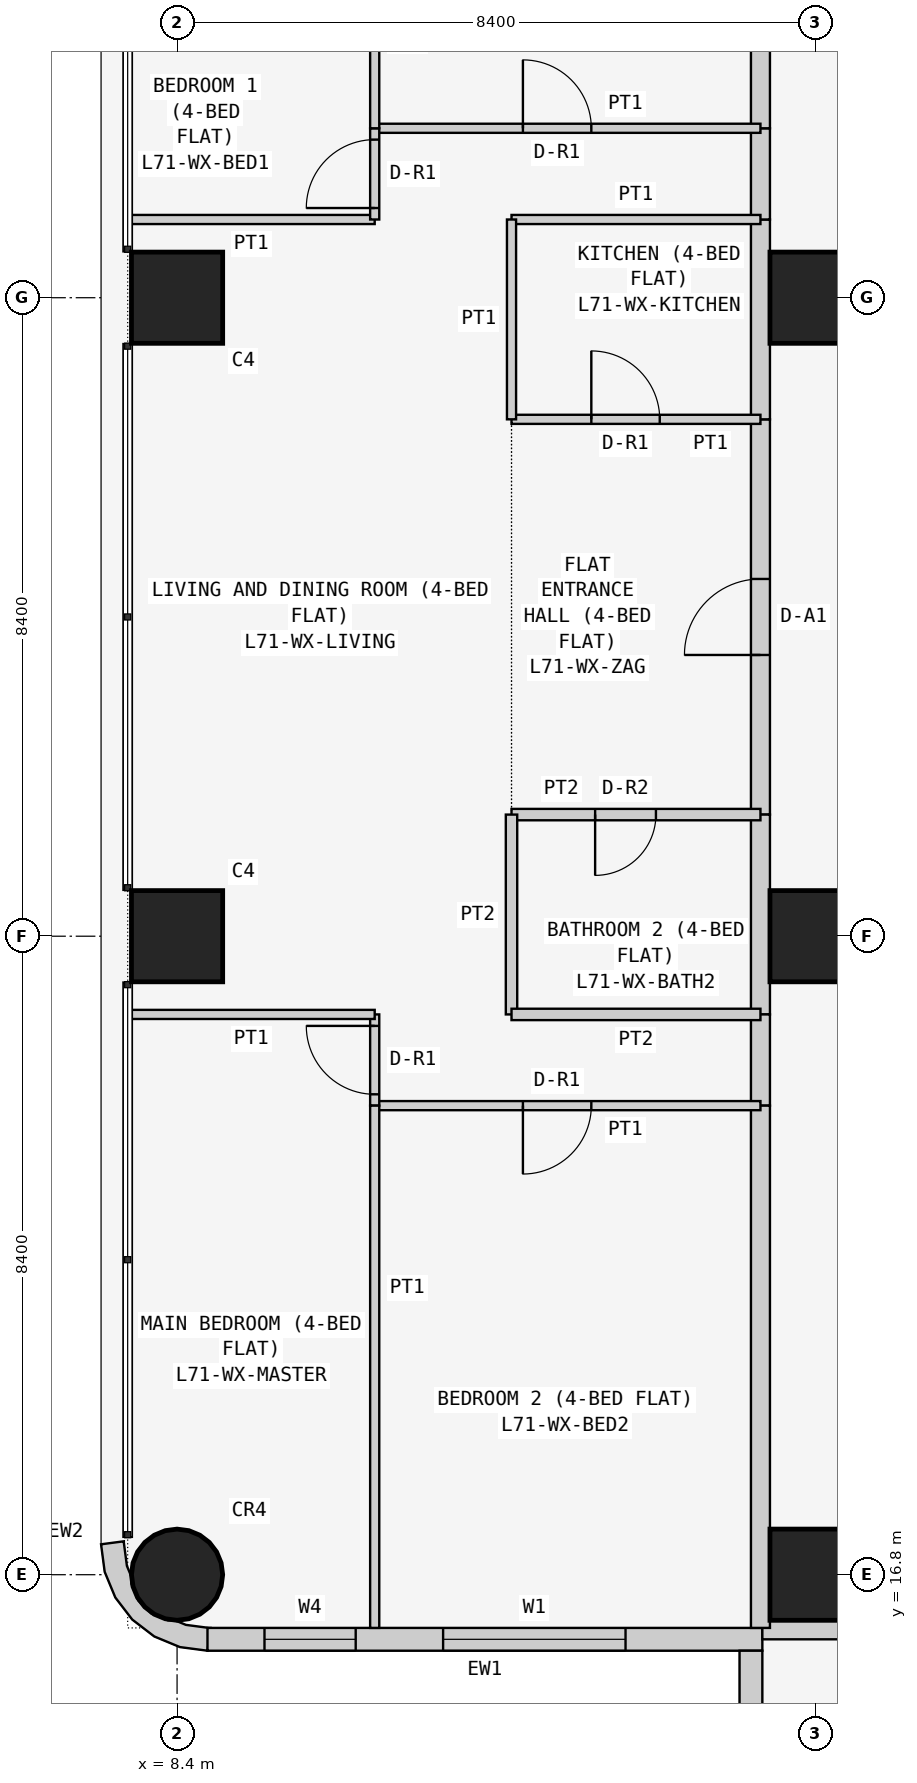
"""IFC4 building model, lengths in metres.
Left out: names, types, materials, properties, quantities, classifications, styles, units other than length and angle.
Written with IfcOpenShell. Run it as: python <this file> out.ifc"""

import sys

from ifc_helpers import new_model, si_unit, direction, frame, frame_2d, origin, origin_2d, place, context, subcontext, project, spatial, polyline, rectangle, circle, outline, extrude, element, fill, save


model = new_model("IFC4")
c1 = context("Model", 3, precision=1e-05, world=origin(), true_north=direction((0.0, 1.0)))
c2 = subcontext(c1, "Body", "Model", "MODEL_VIEW")
j1 = project(units=[si_unit("LENGTHUNIT", "METRE"), si_unit("PLANEANGLEUNIT", "RADIAN")], contexts=[c1])
p1 = place(None, origin())
s1 = spatial("IfcSite", under=j1, at=p1, CompositionType="ELEMENT")
p2 = place(p1, origin())
s2 = spatial("IfcBuilding", under=s1, at=p2, CompositionType="ELEMENT")
p3 = place(p2, frame((0.0, 0.0, 272.1)))
s3 = spatial("IfcBuildingStorey", under=s2, at=p3, CompositionType="ELEMENT", Elevation=272.1)
p4 = place(p3, frame((8.4, 16.8, 0.0), z_axis=(0.0, 0.0, 1.0), x_axis=(1.0, 0.0, 0.0)))
e1 = element("IfcColumn", 1, at=p4, inside=s3, PredefinedType="COLUMN", context=c2, shape_type="SweptSolid", body=[
    extrude(circle(Radius=0.6, at=origin_2d()), origin(), (0.0, 0.0, 1.0), 3.6),
])
for number, where, z_axis, x_axis in (
    (2, (8.4, 25.2, 0.0), (0.0, 0.0, 1.0), (1.0, 0.0, 0.0)),
    (3, (8.4, 33.6, 0.0), (0.0, 0.0, 1.0), (1.0, 0.0, 0.0)),
    (4, (16.8, 16.8, 0.0), (0.0, 0.0, 1.0), (1.0, 0.0, 0.0)),
    (5, (16.8, 25.2, 0.0), (0.0, 0.0, 1.0), (1.0, 0.0, 0.0)),
    (6, (16.8, 33.6, 0.0), (0.0, 0.0, 1.0), (1.0, 0.0, 0.0)),
):
    element("IfcColumn", number, at=place(p3, frame(where, z_axis=z_axis, x_axis=x_axis)), inside=s3, PredefinedType="COLUMN", context=c2, shape_type="SweptSolid", body=[
        extrude(rectangle(XDim=1.2, YDim=1.2, at=origin_2d()), origin(), (0.0, 0.0, 1.0), 3.6),
    ])
p5 = place(p3, frame((8.8, 15.95, 0.0), z_axis=(0.0, 0.0, 1.0), x_axis=(1.0, 0.0, 0.0)))
e7 = element("IfcWall", 7, at=p5, inside=s3, PredefinedType="SOLIDWALL", context=c2, shape_type="SweptSolid", body=[
    extrude(rectangle(XDim=7.3, YDim=0.3, at=frame_2d((3.65, 0.0))), origin(), (0.0, 0.0, 1.0), 3.45),
])
p6 = place(p5, frame((3.1, 0.0, 0.9)))
e8 = element("IfcOpeningElement", 8, at=p6, cuts=e7, PredefinedType="OPENING", context=c2, shape_type="SweptSolid", body=[
    extrude(rectangle(XDim=2.4, YDim=1.5, at=frame_2d((1.2, 0.75))), frame((0.0, 0.16, 0.0), z_axis=(0.0, -1.0, 0.0), x_axis=(1.0, 0.0, 0.0)), (0.0, 0.0, 1.0), 0.32),
])
p7 = place(p5, frame((0.75, 0.0, 0.9)))
e9 = element("IfcOpeningElement", 9, at=p7, cuts=e7, PredefinedType="OPENING", context=c2, shape_type="SweptSolid", body=[
    extrude(rectangle(XDim=1.2, YDim=1.5, at=frame_2d((0.6, 0.75))), frame((0.0, 0.16, 0.0), z_axis=(0.0, -1.0, 0.0), x_axis=(1.0, 0.0, 0.0)), (0.0, 0.0, 1.0), 0.32),
])
p8 = place(p3, frame((15.95, 15.8, 0.0), z_axis=(0.0, 0.0, 1.0), x_axis=(0.0, -1.0, 0.0)))
e10 = element("IfcWall", 10, at=p8, inside=s3, PredefinedType="SOLIDWALL", context=c2, shape_type="SweptSolid", body=[
    extrude(rectangle(XDim=7.0, YDim=0.3, at=frame_2d((3.5, 0.0))), origin(), (0.0, 0.0, 1.0), 3.45),
])
p9 = place(p8, frame((1.5, 0.0, 0.9)))
e11 = element("IfcOpeningElement", 11, at=p9, cuts=e10, PredefinedType="OPENING", context=c2, shape_type="SweptSolid", body=[
    extrude(rectangle(XDim=2.4, YDim=1.5, at=frame_2d((1.2, 0.75))), frame((0.0, 0.16, 0.0), z_axis=(0.0, -1.0, 0.0), x_axis=(1.0, 0.0, 0.0)), (0.0, 0.0, 1.0), 0.32),
])
p10 = place(p8, frame((5.05, 0.0, 0.9)))
e12 = element("IfcOpeningElement", 12, at=p10, cuts=e10, PredefinedType="OPENING", context=c2, shape_type="SweptSolid", body=[
    extrude(rectangle(XDim=1.2, YDim=1.5, at=frame_2d((0.6, 0.75))), frame((0.0, 0.16, 0.0), z_axis=(0.0, -1.0, 0.0), x_axis=(1.0, 0.0, 0.0)), (0.0, 0.0, 1.0), 0.32),
])
p11 = place(p3, frame((7.824, 17.162, 0.0), z_axis=(0.0, 0.0, 1.0), x_axis=(-0.707106781187, -0.707106781187, 0.0)))
e13 = element("IfcWall", 13, at=p11, inside=s3, PredefinedType="SOLIDWALL", context=c2, shape_type="SweptSolid", body=[
    extrude(outline(polyline([(0.047, 1.454), (0.233, 1.212), (0.292, 1.069), (0.358, 1.003), (0.449, 0.782), (0.449, 0.543), (0.358, 0.323), (0.292, 0.257), (0.233, 0.114), (0.047, -0.129), (0.033, -0.143), (0.273, -0.327), (0.495, -0.037), (0.635, 0.301), (0.683, 0.663), (0.635, 1.025), (0.495, 1.363), (0.273, 1.653), (0.033, 1.469), (0.047, 1.454)])), origin(), (0.0, 0.0, 1.0), 3.45),
])
p12 = place(p3, frame((22.571, 16.075, 0.0), z_axis=(0.0, 0.0, 1.0), x_axis=(-1.0, 0.0, 0.0)))
e14 = element("IfcWall", 14, at=p12, inside=s3, PredefinedType="PARTITIONING", context=c2, shape_type="SweptSolid", body=[
    extrude(rectangle(XDim=6.471, YDim=0.25, at=frame_2d((3.235, 0.0))), origin(), (0.0, 0.0, 1.0), 3.45),
])
p13 = place(p3, frame((16.075, 26.8, 0.0), z_axis=(0.0, 0.0, 1.0), x_axis=(0.0, 1.0, 0.0)))
e15 = element("IfcWall", 15, at=p13, inside=s3, PredefinedType="PARTITIONING", context=c2, shape_type="SweptSolid", body=[
    extrude(rectangle(XDim=5.2, YDim=0.25, at=frame_2d((2.6, 0.0))), origin(), (0.0, 0.0, 1.0), 3.45),
])
p14 = place(p13, frame((2.1, 0.0, 0.0)))
e16 = element("IfcOpeningElement", 16, at=p14, cuts=e15, PredefinedType="OPENING", context=c2, shape_type="SweptSolid", body=[
    extrude(rectangle(XDim=1.0, YDim=2.1, at=frame_2d((0.5, 1.05))), frame((0.0, 0.135, 0.0), z_axis=(0.0, -1.0, 0.0), x_axis=(1.0, 0.0, 0.0)), (0.0, 0.0, 1.0), 0.27),
])
p15 = place(p3, frame((16.075, 24.171, 0.0), z_axis=(0.0, 0.0, 1.0), x_axis=(0.0, 1.0, 0.0)))
e17 = element("IfcWall", 17, at=p15, inside=s3, PredefinedType="PARTITIONING", context=c2, shape_type="SweptSolid", body=[
    extrude(rectangle(XDim=2.629, YDim=0.25, at=frame_2d((1.314, 0.0))), origin(), (0.0, 0.0, 1.0), 3.45),
])
p16 = place(p3, frame((16.075, 32.0, 0.0), z_axis=(0.0, 0.0, 1.0), x_axis=(0.0, 1.0, 0.0)))
e18 = element("IfcWall", 18, at=p16, inside=s3, PredefinedType="PARTITIONING", context=c2, shape_type="SweptSolid", body=[
    extrude(rectangle(XDim=2.629, YDim=0.25, at=frame_2d((1.314, 0.0))), origin(), (0.0, 0.0, 1.0), 3.45),
])
p17 = place(p3, frame((16.075, 22.971, 0.0), z_axis=(0.0, 0.0, 1.0), x_axis=(0.0, 1.0, 0.0)))
e19 = element("IfcWall", 19, at=p17, inside=s3, PredefinedType="PARTITIONING", context=c2, shape_type="SweptSolid", body=[
    extrude(rectangle(XDim=1.2, YDim=0.25, at=frame_2d((0.6, 0.0))), origin(), (0.0, 0.0, 1.0), 3.45),
])
p18 = place(p3, frame((16.075, 34.629, 0.0), z_axis=(0.0, 0.0, 1.0), x_axis=(0.0, 1.0, 0.0)))
e20 = element("IfcWall", 20, at=p18, inside=s3, PredefinedType="PARTITIONING", context=c2, shape_type="SweptSolid", body=[
    extrude(rectangle(XDim=1.2, YDim=0.25, at=frame_2d((0.6, 0.0))), origin(), (0.0, 0.0, 1.0), 3.45),
])
for number, where, z_axis, x_axis in (
    (21, (16.075, 16.1, 0.0), (0.0, 0.0, 1.0), (0.0, 1.0, 0.0)),
    (22, (16.075, 35.829, 0.0), (0.0, 0.0, 1.0), (0.0, 1.0, 0.0)),
):
    element("IfcWall", number, at=place(p3, frame(where, z_axis=z_axis, x_axis=x_axis)), inside=s3, PredefinedType="PARTITIONING", context=c2, shape_type="SweptSolid", body=[
        extrude(rectangle(XDim=6.871, YDim=0.25, at=frame_2d((3.436, 0.0))), origin(), (0.0, 0.0, 1.0), 3.45),
    ])
p19 = place(p3, frame((12.8, 26.8, 0.0), z_axis=(0.0, 0.0, 1.0), x_axis=(1.0, 0.0, 0.0)))
e23 = element("IfcWall", 23, at=p19, inside=s3, PredefinedType="PARTITIONING", context=c2, shape_type="SweptSolid", body=[
    extrude(rectangle(XDim=3.275, YDim=0.15, at=frame_2d((1.637, 0.0))), origin(), (0.0, 0.0, 1.0), 3.45),
])
p20 = place(p19, frame((1.1, 0.0, 0.0)))
e24 = element("IfcOpeningElement", 24, at=p20, cuts=e23, PredefinedType="OPENING", context=c2, shape_type="SweptSolid", body=[
    extrude(rectangle(XDim=0.8, YDim=2.1, at=frame_2d((0.4, 1.05))), frame((0.0, 0.085, 0.0), z_axis=(0.0, -1.0, 0.0), x_axis=(1.0, 0.0, 0.0)), (0.0, 0.0, 1.0), 0.17),
])
p21 = place(p3, frame((16.075, 32.0, 0.0), z_axis=(0.0, 0.0, 1.0), x_axis=(-1.0, 0.0, 0.0)))
e25 = element("IfcWall", 25, at=p21, inside=s3, PredefinedType="PARTITIONING", context=c2, shape_type="SweptSolid", body=[
    extrude(rectangle(XDim=3.275, YDim=0.12, at=frame_2d((1.637, 0.0))), origin(), (0.0, 0.0, 1.0), 3.45),
])
p22 = place(p21, frame((1.325, 0.0, 0.0)))
e26 = element("IfcOpeningElement", 26, at=p22, cuts=e25, PredefinedType="OPENING", context=c2, shape_type="SweptSolid", body=[
    extrude(rectangle(XDim=0.9, YDim=2.1, at=frame_2d((0.45, 1.05))), frame((0.0, 0.07, 0.0), z_axis=(0.0, -1.0, 0.0), x_axis=(1.0, 0.0, 0.0)), (0.0, 0.0, 1.0), 0.14),
])
p23 = place(p3, frame((12.8, 26.8, 0.0), z_axis=(0.0, 0.0, 1.0), x_axis=(0.0, -1.0, 0.0)))
e27 = element("IfcWall", 27, at=p23, inside=s3, PredefinedType="PARTITIONING", context=c2, shape_type="SweptSolid", body=[
    extrude(rectangle(XDim=2.629, YDim=0.15, at=frame_2d((1.314, 0.0))), origin(), (0.0, 0.0, 1.0), 3.45),
])
p24 = place(p3, frame((12.8, 24.171, 0.0), z_axis=(0.0, 0.0, 1.0), x_axis=(1.0, 0.0, 0.0)))
e28 = element("IfcWall", 28, at=p24, inside=s3, PredefinedType="PARTITIONING", context=c2, shape_type="SweptSolid", body=[
    extrude(rectangle(XDim=3.275, YDim=0.15, at=frame_2d((1.637, 0.0))), origin(), (0.0, 0.0, 1.0), 3.45),
])
p25 = place(p3, frame((16.075, 34.629, 0.0), z_axis=(0.0, 0.0, 1.0), x_axis=(-1.0, 0.0, 0.0)))
e29 = element("IfcWall", 29, at=p25, inside=s3, PredefinedType="PARTITIONING", context=c2, shape_type="SweptSolid", body=[
    extrude(rectangle(XDim=3.275, YDim=0.12, at=frame_2d((1.637, 0.0))), origin(), (0.0, 0.0, 1.0), 3.45),
])
p26 = place(p3, frame((12.8, 34.629, 0.0), z_axis=(0.0, 0.0, 1.0), x_axis=(0.0, -1.0, 0.0)))
e30 = element("IfcWall", 30, at=p26, inside=s3, PredefinedType="PARTITIONING", context=c2, shape_type="SweptSolid", body=[
    extrude(rectangle(XDim=2.629, YDim=0.12, at=frame_2d((1.314, 0.0))), origin(), (0.0, 0.0, 1.0), 3.45),
])
p27 = place(p3, frame((16.075, 22.971, 0.0), z_axis=(0.0, 0.0, 1.0), x_axis=(-1.0, 0.0, 0.0)))
e31 = element("IfcWall", 31, at=p27, inside=s3, PredefinedType="PARTITIONING", context=c2, shape_type="SweptSolid", body=[
    extrude(rectangle(XDim=5.075, YDim=0.12, at=frame_2d((2.538, 0.0))), origin(), (0.0, 0.0, 1.0), 3.45),
])
p28 = place(p27, frame((2.225, 0.0, 0.0)))
e32 = element("IfcOpeningElement", 32, at=p28, cuts=e31, PredefinedType="OPENING", context=c2, shape_type="SweptSolid", body=[
    extrude(rectangle(XDim=0.9, YDim=2.1, at=frame_2d((0.45, 1.05))), frame((0.0, 0.07, 0.0), z_axis=(0.0, -1.0, 0.0), x_axis=(1.0, 0.0, 0.0)), (0.0, 0.0, 1.0), 0.14),
])
p29 = place(p3, frame((11.0, 22.971, 0.0), z_axis=(0.0, 0.0, 1.0), x_axis=(0.0, 1.0, 0.0)))
e33 = element("IfcWall", 33, at=p29, inside=s3, PredefinedType="PARTITIONING", context=c2, shape_type="SweptSolid", body=[
    extrude(rectangle(XDim=1.2, YDim=0.12, at=frame_2d((0.6, 0.0))), origin(), (0.0, 0.0, 1.0), 3.45),
])
p30 = place(p29, frame((0.149, 0.0, 0.0)))
e34 = element("IfcOpeningElement", 34, at=p30, cuts=e33, PredefinedType="OPENING", context=c2, shape_type="SweptSolid", body=[
    extrude(rectangle(XDim=0.9, YDim=2.1, at=frame_2d((0.45, 1.05))), frame((0.0, 0.07, 0.0), z_axis=(0.0, -1.0, 0.0), x_axis=(1.0, 0.0, 0.0)), (0.0, 0.0, 1.0), 0.14),
])
p31 = place(p3, frame((11.0, 24.171, 0.0), z_axis=(0.0, 0.0, 1.0), x_axis=(-1.0, 0.0, 0.0)))
e35 = element("IfcWall", 35, at=p31, inside=s3, PredefinedType="PARTITIONING", context=c2, shape_type="SweptSolid", body=[
    extrude(rectangle(XDim=3.25, YDim=0.12, at=frame_2d((1.625, 0.0))), origin(), (0.0, 0.0, 1.0), 3.45),
])
p32 = place(p3, frame((11.0, 35.829, 0.0), z_axis=(0.0, 0.0, 1.0), x_axis=(1.0, 0.0, 0.0)))
e36 = element("IfcWall", 36, at=p32, inside=s3, PredefinedType="PARTITIONING", context=c2, shape_type="SweptSolid", body=[
    extrude(rectangle(XDim=5.075, YDim=0.12, at=frame_2d((2.538, 0.0))), origin(), (0.0, 0.0, 1.0), 3.45),
])
p33 = place(p32, frame((1.95, 0.0, 0.0)))
e37 = element("IfcOpeningElement", 37, at=p33, cuts=e36, PredefinedType="OPENING", context=c2, shape_type="SweptSolid", body=[
    extrude(rectangle(XDim=0.9, YDim=2.1, at=frame_2d((0.45, 1.05))), frame((0.0, 0.07, 0.0), z_axis=(0.0, -1.0, 0.0), x_axis=(1.0, 0.0, 0.0)), (0.0, 0.0, 1.0), 0.14),
])
p34 = place(p3, frame((7.75, 34.629, 0.0), z_axis=(0.0, 0.0, 1.0), x_axis=(1.0, 0.0, 0.0)))
e38 = element("IfcWall", 38, at=p34, inside=s3, PredefinedType="PARTITIONING", context=c2, shape_type="SweptSolid", body=[
    extrude(rectangle(XDim=3.25, YDim=0.12, at=frame_2d((1.625, 0.0))), origin(), (0.0, 0.0, 1.0), 3.45),
])
p35 = place(p3, frame((11.0, 34.629, 0.0), z_axis=(0.0, 0.0, 1.0), x_axis=(0.0, 1.0, 0.0)))
e39 = element("IfcWall", 39, at=p35, inside=s3, PredefinedType="PARTITIONING", context=c2, shape_type="SweptSolid", body=[
    extrude(rectangle(XDim=1.2, YDim=0.12, at=frame_2d((0.6, 0.0))), origin(), (0.0, 0.0, 1.0), 3.45),
])
p36 = place(p35, frame((0.151, 0.0, 0.0)))
e40 = element("IfcOpeningElement", 40, at=p36, cuts=e39, PredefinedType="OPENING", context=c2, shape_type="SweptSolid", body=[
    extrude(rectangle(XDim=0.9, YDim=2.1, at=frame_2d((0.45, 1.05))), frame((0.0, 0.07, 0.0), z_axis=(0.0, -1.0, 0.0), x_axis=(1.0, 0.0, 0.0)), (0.0, 0.0, 1.0), 0.14),
])
p37 = place(p3, frame((11.0, 22.971, 0.0), z_axis=(0.0, 0.0, 1.0), x_axis=(0.0, -1.0, 0.0)))
e41 = element("IfcWall", 41, at=p37, inside=s3, PredefinedType="PARTITIONING", context=c2, shape_type="SweptSolid", body=[
    extrude(rectangle(XDim=6.871, YDim=0.12, at=frame_2d((3.436, 0.0))), origin(), (0.0, 0.0, 1.0), 3.45),
])
p38 = place(p3, frame((11.0, 38.114, 0.0), z_axis=(0.0, 0.0, 1.0), x_axis=(0.0, -1.0, 0.0)))
e42 = element("IfcWall", 42, at=p38, inside=s3, PredefinedType="PARTITIONING", context=c2, shape_type="SweptSolid", body=[
    extrude(rectangle(XDim=2.285, YDim=0.12, at=frame_2d((1.143, 0.0))), origin(), (0.0, 0.0, 1.0), 3.45),
])
p39 = place(p6, origin())
e43 = element("IfcWindow", 43, at=p39, inside=s3, PartitioningType="SINGLE_PANEL", PredefinedType="WINDOW", context=c2, shape_type="SweptSolid", body=[
    extrude(rectangle(XDim=2.4, YDim=1.5, at=frame_2d((1.2, 0.75))), frame((0.0, 0.03, 0.0), z_axis=(0.0, -1.0, 0.0), x_axis=(1.0, 0.0, 0.0)), (0.0, 0.0, 1.0), 0.06),
])
fill(e8, e43)
p40 = place(p7, origin())
e44 = element("IfcWindow", 44, at=p40, inside=s3, PartitioningType="SINGLE_PANEL", PredefinedType="WINDOW", context=c2, shape_type="SweptSolid", body=[
    extrude(rectangle(XDim=1.2, YDim=1.5, at=frame_2d((0.6, 0.75))), frame((0.0, 0.03, 0.0), z_axis=(0.0, -1.0, 0.0), x_axis=(1.0, 0.0, 0.0)), (0.0, 0.0, 1.0), 0.06),
])
fill(e9, e44)
p41 = place(p14, origin())
e45 = element("IfcDoor", 45, at=p41, inside=s3, OperationType="SINGLE_SWING_LEFT", PredefinedType="DOOR", context=c2, shape_type="SweptSolid", body=[
    extrude(rectangle(XDim=1.0, YDim=2.1, at=frame_2d((0.5, 1.05))), frame((0.0, 0.025, 0.0), z_axis=(0.0, -1.0, 0.0), x_axis=(1.0, 0.0, 0.0)), (0.0, 0.0, 1.0), 0.05),
])
fill(e16, e45)
p42 = place(p20, frame((0.8, 0.0, 0.0), z_axis=(0.0, 0.0, 1.0), x_axis=(-1.0, 0.0, 0.0)))
e46 = element("IfcDoor", 46, at=p42, inside=s3, OperationType="SINGLE_SWING_RIGHT", PredefinedType="DOOR", context=c2, shape_type="SweptSolid", body=[
    extrude(rectangle(XDim=0.8, YDim=2.1, at=frame_2d((0.4, 1.05))), frame((0.0, 0.025, 0.0), z_axis=(0.0, -1.0, 0.0), x_axis=(1.0, 0.0, 0.0)), (0.0, 0.0, 1.0), 0.05),
])
fill(e24, e46)
p43 = place(p22, frame((0.9, 0.0, 0.0), z_axis=(0.0, 0.0, 1.0), x_axis=(-1.0, 0.0, 0.0)))
e47 = element("IfcDoor", 47, at=p43, inside=s3, OperationType="SINGLE_SWING_LEFT", PredefinedType="DOOR", context=c2, shape_type="SweptSolid", body=[
    extrude(rectangle(XDim=0.9, YDim=2.1, at=frame_2d((0.45, 1.05))), frame((0.0, 0.025, 0.0), z_axis=(0.0, -1.0, 0.0), x_axis=(1.0, 0.0, 0.0)), (0.0, 0.0, 1.0), 0.05),
])
fill(e26, e47)
p44 = place(p28, origin())
e48 = element("IfcDoor", 48, at=p44, inside=s3, OperationType="SINGLE_SWING_RIGHT", PredefinedType="DOOR", context=c2, shape_type="SweptSolid", body=[
    extrude(rectangle(XDim=0.9, YDim=2.1, at=frame_2d((0.45, 1.05))), frame((0.0, 0.025, 0.0), z_axis=(0.0, -1.0, 0.0), x_axis=(1.0, 0.0, 0.0)), (0.0, 0.0, 1.0), 0.05),
])
fill(e32, e48)
p45 = place(p30, origin())
e49 = element("IfcDoor", 49, at=p45, inside=s3, OperationType="SINGLE_SWING_RIGHT", PredefinedType="DOOR", context=c2, shape_type="SweptSolid", body=[
    extrude(rectangle(XDim=0.9, YDim=2.1, at=frame_2d((0.45, 1.05))), frame((0.0, 0.025, 0.0), z_axis=(0.0, -1.0, 0.0), x_axis=(1.0, 0.0, 0.0)), (0.0, 0.0, 1.0), 0.05),
])
fill(e34, e49)
p46 = place(p33, origin())
e50 = element("IfcDoor", 50, at=p46, inside=s3, OperationType="SINGLE_SWING_LEFT", PredefinedType="DOOR", context=c2, shape_type="SweptSolid", body=[
    extrude(rectangle(XDim=0.9, YDim=2.1, at=frame_2d((0.45, 1.05))), frame((0.0, 0.025, 0.0), z_axis=(0.0, -1.0, 0.0), x_axis=(1.0, 0.0, 0.0)), (0.0, 0.0, 1.0), 0.05),
])
fill(e37, e50)
p47 = place(p36, origin())
e51 = element("IfcDoor", 51, at=p47, inside=s3, OperationType="SINGLE_SWING_LEFT", PredefinedType="DOOR", context=c2, shape_type="SweptSolid", body=[
    extrude(rectangle(XDim=0.9, YDim=2.1, at=frame_2d((0.45, 1.05))), frame((0.0, 0.025, 0.0), z_axis=(0.0, -1.0, 0.0), x_axis=(1.0, 0.0, 0.0)), (0.0, 0.0, 1.0), 0.05),
])
fill(e40, e51)
save(model, sys.argv[1])
